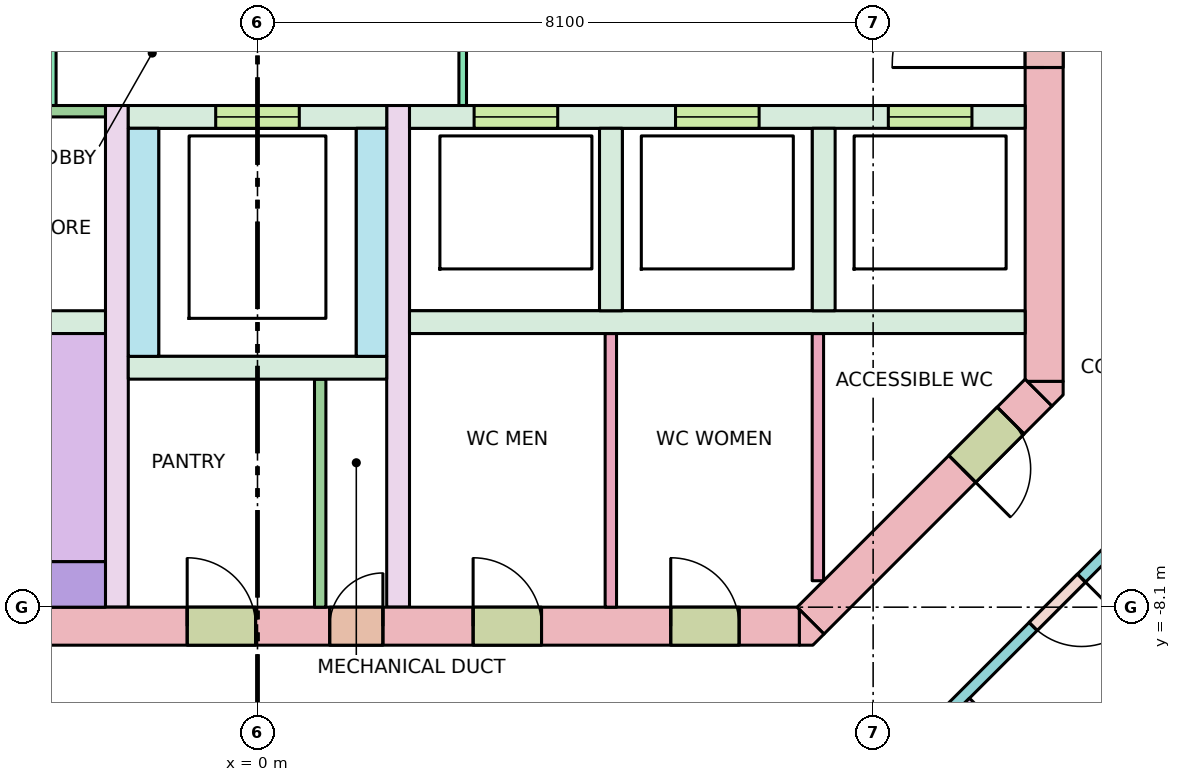
"""IFC4 building model, lengths in metres.
Left out: names, types, materials, properties, quantities, classifications, styles, units other than length and angle.
Written with IfcOpenShell. Run it as: python <this file> out.ifc"""

import sys

from ifc_helpers import new_model, si_unit, direction, frame, frame_2d, origin, place, context, subcontext, project, spatial, polyline, rectangle, outline, extrude, element, fill, save


model = new_model("IFC4")
c1 = context("Model", 3, precision=1e-05, world=origin(), true_north=direction((0.0, 1.0)))
c2 = subcontext(c1, "Body", "Model", "MODEL_VIEW")
j1 = project(units=[si_unit("LENGTHUNIT", "METRE"), si_unit("PLANEANGLEUNIT", "RADIAN")], contexts=[c1])
p1 = place(None, origin())
s1 = spatial("IfcSite", under=j1, at=p1, CompositionType="ELEMENT")
p2 = place(p1, origin())
s2 = spatial("IfcBuilding", under=s1, at=p2, CompositionType="ELEMENT")
p3 = place(p2, frame((0.0, 0.0, 253.8)))
s3 = spatial("IfcBuildingStorey", under=s2, at=p3, CompositionType="ELEMENT", Elevation=253.8)
p4 = place(p3, frame((-7.13, -8.35, -0.28), z_axis=(0.0, 0.0, 1.0), x_axis=(1.0, 0.0, 0.0)))
e1 = element("IfcWall", 1, at=p4, inside=s3, PredefinedType="SHEAR", context=c2, shape_type="SweptSolid", body=[
    extrude(rectangle(XDim=14.26, YDim=0.5, at=frame_2d((7.13, 0.0))), origin(), (0.0, 0.0, 1.0), 3.7),
])
p5 = place(p4, frame((8.08, 0.0, 0.28)))
e2 = element("IfcOpeningElement", 2, at=p5, cuts=e1, PredefinedType="OPENING", context=c2, shape_type="SweptSolid", body=[
    extrude(rectangle(XDim=0.7, YDim=2.1, at=frame_2d((0.35, 1.05))), frame((0.0, 0.26, 0.0), z_axis=(0.0, -1.0, 0.0), x_axis=(1.0, 0.0, 0.0)), (0.0, 0.0, 1.0), 0.52),
])
p6 = place(p4, frame((6.205, 0.0, 0.28)))
e3 = element("IfcOpeningElement", 3, at=p6, cuts=e1, PredefinedType="OPENING", context=c2, shape_type="SweptSolid", body=[
    extrude(rectangle(XDim=0.9, YDim=2.1, at=frame_2d((0.45, 1.05))), frame((0.0, 0.26, 0.0), z_axis=(0.0, -1.0, 0.0), x_axis=(1.0, 0.0, 0.0)), (0.0, 0.0, 1.0), 0.52),
])
p7 = place(p4, frame((9.967, 0.0, 0.28)))
e4 = element("IfcOpeningElement", 4, at=p7, cuts=e1, PredefinedType="OPENING", context=c2, shape_type="SweptSolid", body=[
    extrude(rectangle(XDim=0.9, YDim=2.1, at=frame_2d((0.45, 1.05))), frame((0.0, 0.26, 0.0), z_axis=(0.0, -1.0, 0.0), x_axis=(1.0, 0.0, 0.0)), (0.0, 0.0, 1.0), 0.52),
])
p8 = place(p4, frame((12.567, 0.0, 0.28)))
e5 = element("IfcOpeningElement", 5, at=p8, cuts=e1, PredefinedType="OPENING", context=c2, shape_type="SweptSolid", body=[
    extrude(rectangle(XDim=0.9, YDim=2.1, at=frame_2d((0.45, 1.05))), frame((0.0, 0.26, 0.0), z_axis=(0.0, -1.0, 0.0), x_axis=(1.0, 0.0, 0.0)), (0.0, 0.0, 1.0), 0.52),
])
p9 = place(p3, frame((10.35, -5.13, -0.28), z_axis=(0.0, 0.0, 1.0), x_axis=(0.0, 1.0, 0.0)))
e6 = element("IfcWall", 6, at=p9, inside=s3, PredefinedType="SHEAR", context=c2, shape_type="SweptSolid", body=[
    extrude(rectangle(XDim=10.26, YDim=0.5, at=frame_2d((5.13, 0.0))), origin(), (0.0, 0.0, 1.0), 3.7),
])
p10 = place(p9, frame((4.13, 0.0, 0.28)))
e7 = element("IfcOpeningElement", 7, at=p10, cuts=e6, PredefinedType="OPENING", context=c2, shape_type="SweptSolid", body=[
    extrude(rectangle(XDim=2.0, YDim=2.1, at=frame_2d((1.0, 1.05))), frame((0.0, 0.26, 0.0), z_axis=(0.0, -1.0, 0.0), x_axis=(1.0, 0.0, 0.0)), (0.0, 0.0, 1.0), 0.52),
])
p11 = place(p3, frame((10.277, -5.277, -0.28), z_axis=(0.0, 0.0, 1.0), x_axis=(-0.707106781187, -0.707106781187, 0.0)))
e8 = element("IfcWall", 8, at=p11, inside=s3, PredefinedType="SHEAR", context=c2, shape_type="SweptSolid", body=[
    extrude(rectangle(XDim=4.243, YDim=0.5, at=frame_2d((2.121, 0.0))), origin(), (0.0, 0.0, 1.0), 3.7),
])
p12 = place(p11, frame((0.52, 0.0, 0.28)))
e9 = element("IfcOpeningElement", 9, at=p12, cuts=e8, PredefinedType="OPENING", context=c2, shape_type="SweptSolid", body=[
    extrude(rectangle(XDim=0.9, YDim=2.1, at=frame_2d((0.45, 1.05))), frame((0.0, 0.26, 0.0), z_axis=(0.0, -1.0, 0.0), x_axis=(1.0, 0.0, 0.0)), (0.0, 0.0, 1.0), 0.52),
])
p13 = place(p3, frame((0.0, 0.0, -0.28)))
e10 = element("IfcWall", 10, at=p13, inside=s3, PredefinedType="SHEAR", context=c2, shape_type="SweptSolid", body=[
    extrude(outline(polyline([(7.307, -8.6), (7.13, -8.6), (7.13, -8.13), (7.454, -8.454), (7.307, -8.6)])), origin(), (0.0, 0.0, 1.0), 3.7),
])
p14 = place(p3, frame((0.0, 0.0, -0.28)))
e11 = element("IfcWall", 11, at=p14, inside=s3, PredefinedType="SHEAR", context=c2, shape_type="SweptSolid", body=[
    extrude(outline(polyline([(10.6, -5.307), (10.454, -5.454), (10.13, -5.13), (10.6, -5.13), (10.6, -5.307)])), origin(), (0.0, 0.0, 1.0), 3.7),
])
for number, where, z_axis, x_axis in (
    (12, (-10.1, -4.35, 0.0), (0.0, 0.0, 1.0), (1.0, 0.0, 0.0)),
    (13, (2.0, -4.35, 0.0), (0.0, 0.0, 1.0), (1.0, 0.0, 0.0)),
):
    element("IfcWall", number, at=place(p3, frame(where, z_axis=z_axis, x_axis=x_axis)), inside=s3, PredefinedType="SOLIDWALL", context=c2, shape_type="SweptSolid", body=[
        extrude(rectangle(XDim=8.1, YDim=0.3, at=frame_2d((4.05, 0.0))), origin(), (0.0, 0.0, 1.0), 3.42),
    ])
p15 = place(p3, frame((2.0, -1.65, 0.0), z_axis=(0.0, 0.0, 1.0), x_axis=(1.0, 0.0, 0.0)))
e14 = element("IfcWall", 14, at=p15, inside=s3, PredefinedType="SOLIDWALL", context=c2, shape_type="SweptSolid", body=[
    extrude(rectangle(XDim=8.1, YDim=0.3, at=frame_2d((4.05, 0.0))), origin(), (0.0, 0.0, 1.0), 3.42),
])
p16 = place(p15, frame((0.85, 0.0, 0.0)))
e15 = element("IfcOpeningElement", 15, at=p16, cuts=e14, PredefinedType="OPENING", context=c2, shape_type="SweptSolid", body=[
    extrude(rectangle(XDim=1.1, YDim=2.1, at=frame_2d((0.55, 1.05))), frame((0.0, 0.16, 0.0), z_axis=(0.0, -1.0, 0.0), x_axis=(1.0, 0.0, 0.0)), (0.0, 0.0, 1.0), 0.32),
])
p17 = place(p15, frame((3.5, 0.0, 0.0)))
e16 = element("IfcOpeningElement", 16, at=p17, cuts=e14, PredefinedType="OPENING", context=c2, shape_type="SweptSolid", body=[
    extrude(rectangle(XDim=1.1, YDim=2.1, at=frame_2d((0.55, 1.05))), frame((0.0, 0.16, 0.0), z_axis=(0.0, -1.0, 0.0), x_axis=(1.0, 0.0, 0.0)), (0.0, 0.0, 1.0), 0.32),
])
p18 = place(p15, frame((6.3, 0.0, 0.0)))
e17 = element("IfcOpeningElement", 17, at=p18, cuts=e14, PredefinedType="OPENING", context=c2, shape_type="SweptSolid", body=[
    extrude(rectangle(XDim=1.1, YDim=2.1, at=frame_2d((0.55, 1.05))), frame((0.0, 0.16, 0.0), z_axis=(0.0, -1.0, 0.0), x_axis=(1.0, 0.0, 0.0)), (0.0, 0.0, 1.0), 0.32),
])
for number, where, z_axis, x_axis in (
    (18, (4.65, -4.2, 0.0), (0.0, 0.0, 1.0), (0.0, 1.0, 0.0)),
    (19, (7.45, -4.2, 0.0), (0.0, 0.0, 1.0), (0.0, 1.0, 0.0)),
):
    element("IfcWall", number, at=place(p3, frame(where, z_axis=z_axis, x_axis=x_axis)), inside=s3, PredefinedType="SOLIDWALL", context=c2, shape_type="SweptSolid", body=[
        extrude(rectangle(XDim=2.4, YDim=0.3, at=frame_2d((1.2, 0.0))), origin(), (0.0, 0.0, 1.0), 3.42),
    ])
for number, where, z_axis, x_axis in (
    (20, (-1.85, -8.1, 0.0), (0.0, 0.0, 1.0), (0.0, 1.0, 0.0)),
    (21, (1.85, -8.1, 0.0), (0.0, 0.0, 1.0), (0.0, 1.0, 0.0)),
):
    element("IfcWall", number, at=place(p3, frame(where, z_axis=z_axis, x_axis=x_axis)), inside=s3, PredefinedType="SHEAR", context=c2, shape_type="SweptSolid", body=[
        extrude(rectangle(XDim=6.6, YDim=0.3, at=frame_2d((3.3, 0.0))), origin(), (0.0, 0.0, 1.0), 3.42),
    ])
p19 = place(p3, frame((-1.7, -1.65, 0.0), z_axis=(0.0, 0.0, 1.0), x_axis=(1.0, 0.0, 0.0)))
e22 = element("IfcWall", 22, at=p19, inside=s3, PredefinedType="SOLIDWALL", context=c2, shape_type="SweptSolid", body=[
    extrude(rectangle(XDim=3.4, YDim=0.3, at=frame_2d((1.7, 0.0))), origin(), (0.0, 0.0, 1.0), 3.42),
])
p20 = place(p19, frame((1.15, 0.0, 0.0)))
e23 = element("IfcOpeningElement", 23, at=p20, cuts=e22, PredefinedType="OPENING", context=c2, shape_type="SweptSolid", body=[
    extrude(rectangle(XDim=1.1, YDim=2.1, at=frame_2d((0.55, 1.05))), frame((0.0, 0.16, 0.0), z_axis=(0.0, -1.0, 0.0), x_axis=(1.0, 0.0, 0.0)), (0.0, 0.0, 1.0), 0.32),
])
for number, where, z_axis, x_axis in (
    (24, (-1.5, -4.8, 0.0), (0.0, 0.0, 1.0), (0.0, 1.0, 0.0)),
    (25, (1.5, -4.8, 0.0), (0.0, 0.0, 1.0), (0.0, 1.0, 0.0)),
):
    element("IfcWall", number, at=place(p3, frame(where, z_axis=z_axis, x_axis=x_axis)), inside=s3, PredefinedType="SOLIDWALL", context=c2, shape_type="SweptSolid", body=[
        extrude(rectangle(XDim=3.0, YDim=0.4, at=frame_2d((1.5, 0.0))), origin(), (0.0, 0.0, 1.0), 3.42),
    ])
p21 = place(p3, frame((-1.7, -4.95, 0.0), z_axis=(0.0, 0.0, 1.0), x_axis=(1.0, 0.0, 0.0)))
e26 = element("IfcWall", 26, at=p21, inside=s3, PredefinedType="SOLIDWALL", context=c2, shape_type="SweptSolid", body=[
    extrude(rectangle(XDim=3.4, YDim=0.3, at=frame_2d((1.7, 0.0))), origin(), (0.0, 0.0, 1.0), 3.42),
])
p22 = place(p3, frame((-7.37, -7.8, 0.0), z_axis=(0.0, 0.0, 1.0), x_axis=(1.0, 0.0, 0.0)))
e27 = element("IfcWall", 27, at=p22, inside=s3, PredefinedType="SHEAR", context=c2, shape_type="SweptSolid", body=[
    extrude(rectangle(XDim=5.37, YDim=0.6, at=frame_2d((2.685, 0.0))), origin(), (0.0, 0.0, 1.0), 3.42),
])
p23 = place(p3, frame((-2.7, -1.5, 0.0), z_axis=(0.0, 0.0, 1.0), x_axis=(0.0, 1.0, 0.0)))
e28 = element("IfcWall", 28, at=p23, inside=s3, PredefinedType="PARTITIONING", context=c2, shape_type="SweptSolid", body=[
    extrude(rectangle(XDim=3.0, YDim=0.1, at=frame_2d((1.5, 0.0))), origin(), (0.0, 0.0, 1.0), 3.42),
])
p24 = place(p23, frame((0.9, 0.0, 0.0)))
e29 = element("IfcOpeningElement", 29, at=p24, cuts=e28, PredefinedType="OPENING", context=c2, shape_type="SweptSolid", body=[
    extrude(rectangle(XDim=1.2, YDim=2.1, at=frame_2d((0.6, 1.05))), frame((0.0, 0.06, 0.0), z_axis=(0.0, -1.0, 0.0), x_axis=(1.0, 0.0, 0.0)), (0.0, 0.0, 1.0), 0.12),
])
p25 = place(p3, frame((2.7, -1.5, 0.0), z_axis=(0.0, 0.0, 1.0), x_axis=(0.0, 1.0, 0.0)))
e30 = element("IfcWall", 30, at=p25, inside=s3, PredefinedType="PARTITIONING", context=c2, shape_type="SweptSolid", body=[
    extrude(rectangle(XDim=3.0, YDim=0.1, at=frame_2d((1.5, 0.0))), origin(), (0.0, 0.0, 1.0), 3.42),
])
p26 = place(p25, frame((0.9, 0.0, 0.0)))
e31 = element("IfcOpeningElement", 31, at=p26, cuts=e30, PredefinedType="OPENING", context=c2, shape_type="SweptSolid", body=[
    extrude(rectangle(XDim=1.2, YDim=2.1, at=frame_2d((0.6, 1.05))), frame((0.0, 0.06, 0.0), z_axis=(0.0, -1.0, 0.0), x_axis=(1.0, 0.0, 0.0)), (0.0, 0.0, 1.0), 0.12),
])
p27 = place(p3, frame((0.825, -8.1, 0.0), z_axis=(0.0, 0.0, 1.0), x_axis=(0.0, 1.0, 0.0)))
e32 = element("IfcWall", 32, at=p27, inside=s3, PredefinedType="PARTITIONING", context=c2, shape_type="SweptSolid", body=[
    extrude(rectangle(XDim=3.0, YDim=0.15, at=frame_2d((1.5, 0.0))), origin(), (0.0, 0.0, 1.0), 3.42),
])
p28 = place(p3, frame((4.649, -8.1, 0.0), z_axis=(0.0, 0.0, 1.0), x_axis=(0.0, 1.0, 0.0)))
e33 = element("IfcWall", 33, at=p28, inside=s3, PredefinedType="PARTITIONING", context=c2, shape_type="SweptSolid", body=[
    extrude(rectangle(XDim=3.6, YDim=0.15, at=frame_2d((1.8, 0.0))), origin(), (0.0, 0.0, 1.0), 3.42),
])
p29 = place(p3, frame((7.373, -7.752, 0.0), z_axis=(0.0, 0.0, 1.0), x_axis=(0.0, 1.0, 0.0)))
e34 = element("IfcWall", 34, at=p29, inside=s3, PredefinedType="PARTITIONING", context=c2, shape_type="SweptSolid", body=[
    extrude(rectangle(XDim=3.252, YDim=0.15, at=frame_2d((1.626, 0.0))), origin(), (0.0, 0.0, 1.0), 3.42),
])
p30 = place(p3, frame((-10.1, -1.575, 0.0), z_axis=(0.0, 0.0, 1.0), x_axis=(1.0, 0.0, 0.0)))
e35 = element("IfcWall", 35, at=p30, inside=s3, PredefinedType="PARTITIONING", context=c2, shape_type="SweptSolid", body=[
    extrude(rectangle(XDim=8.1, YDim=0.15, at=frame_2d((4.05, 0.0))), origin(), (0.0, 0.0, 1.0), 3.42),
])
p31 = place(p30, frame((0.941, 0.0, 0.0)))
e36 = element("IfcOpeningElement", 36, at=p31, cuts=e35, PredefinedType="OPENING", context=c2, shape_type="SweptSolid", body=[
    extrude(rectangle(XDim=0.9, YDim=2.1, at=frame_2d((0.45, 1.05))), frame((0.0, 0.085, 0.0), z_axis=(0.0, -1.0, 0.0), x_axis=(1.0, 0.0, 0.0)), (0.0, 0.0, 1.0), 0.17),
])
p32 = place(p30, frame((5.066, 0.0, 0.0)))
e37 = element("IfcOpeningElement", 37, at=p32, cuts=e35, PredefinedType="OPENING", context=c2, shape_type="SweptSolid", body=[
    extrude(rectangle(XDim=0.9, YDim=2.1, at=frame_2d((0.45, 1.05))), frame((0.0, 0.085, 0.0), z_axis=(0.0, -1.0, 0.0), x_axis=(1.0, 0.0, 0.0)), (0.0, 0.0, 1.0), 0.17),
])
p33 = place(p3, frame((12.438, -6.121, 0.0), z_axis=(0.0, 0.0, 1.0), x_axis=(-0.707106781187, -0.707106781187, 0.0)))
e38 = element("IfcWall", 38, at=p33, inside=s3, PredefinedType="PARTITIONING", context=c2, shape_type="SweptSolid", body=[
    extrude(rectangle(XDim=6.105, YDim=0.15, at=frame_2d((3.053, 0.0))), origin(), (0.0, 0.0, 1.0), 2.57),
])
p34 = place(p33, frame((4.811, 0.0, 0.0)))
e39 = element("IfcOpeningElement", 39, at=p34, cuts=e38, PredefinedType="OPENING", context=c2, shape_type="SweptSolid", body=[
    extrude(rectangle(XDim=0.9, YDim=2.1, at=frame_2d((0.45, 1.05))), frame((0.0, 0.085, 0.0), z_axis=(0.0, -1.0, 0.0), x_axis=(1.0, 0.0, 0.0)), (0.0, 0.0, 1.0), 0.17),
])
p35 = place(p33, frame((2.258, 0.0, 0.0)))
e40 = element("IfcOpeningElement", 40, at=p35, cuts=e38, PredefinedType="OPENING", context=c2, shape_type="SweptSolid", body=[
    extrude(rectangle(XDim=0.9, YDim=2.1, at=frame_2d((0.45, 1.05))), frame((0.0, 0.085, 0.0), z_axis=(0.0, -1.0, 0.0), x_axis=(1.0, 0.0, 0.0)), (0.0, 0.0, 1.0), 0.17),
])
p36 = place(p3, frame((9.333, -9.333, 0.0), z_axis=(0.0, 0.0, 1.0), x_axis=(0.707106781187, -0.707106781187, 0.0)))
e41 = element("IfcWall", 41, at=p36, inside=s3, PredefinedType="PARTITIONING", context=c2, shape_type="SweptSolid", body=[
    extrude(rectangle(XDim=7.639, YDim=0.1, at=frame_2d((3.819, 0.0))), origin(), (0.0, 0.0, 1.0), 2.57),
])
p37 = place(p16, origin())
e42 = element("IfcDoor", 42, at=p37, inside=s3, OperationType="DOUBLE_DOOR_SLIDING", PredefinedType="DOOR", context=c2, shape_type="SweptSolid", body=[
    extrude(rectangle(XDim=1.1, YDim=2.1, at=frame_2d((0.55, 1.05))), frame((0.0, 0.025, 0.0), z_axis=(0.0, -1.0, 0.0), x_axis=(1.0, 0.0, 0.0)), (0.0, 0.0, 1.0), 0.05),
])
fill(e15, e42)
p38 = place(p17, origin())
e43 = element("IfcDoor", 43, at=p38, inside=s3, OperationType="DOUBLE_DOOR_SLIDING", PredefinedType="DOOR", context=c2, shape_type="SweptSolid", body=[
    extrude(rectangle(XDim=1.1, YDim=2.1, at=frame_2d((0.55, 1.05))), frame((0.0, 0.025, 0.0), z_axis=(0.0, -1.0, 0.0), x_axis=(1.0, 0.0, 0.0)), (0.0, 0.0, 1.0), 0.05),
])
fill(e16, e43)
p39 = place(p18, origin())
e44 = element("IfcDoor", 44, at=p39, inside=s3, OperationType="DOUBLE_DOOR_SLIDING", PredefinedType="DOOR", context=c2, shape_type="SweptSolid", body=[
    extrude(rectangle(XDim=1.1, YDim=2.1, at=frame_2d((0.55, 1.05))), frame((0.0, 0.025, 0.0), z_axis=(0.0, -1.0, 0.0), x_axis=(1.0, 0.0, 0.0)), (0.0, 0.0, 1.0), 0.05),
])
fill(e17, e44)
p40 = place(p20, origin())
e45 = element("IfcDoor", 45, at=p40, inside=s3, OperationType="DOUBLE_DOOR_SLIDING", PredefinedType="DOOR", context=c2, shape_type="SweptSolid", body=[
    extrude(rectangle(XDim=1.1, YDim=2.1, at=frame_2d((0.55, 1.05))), frame((0.0, 0.025, 0.0), z_axis=(0.0, -1.0, 0.0), x_axis=(1.0, 0.0, 0.0)), (0.0, 0.0, 1.0), 0.05),
])
fill(e23, e45)
p41 = place(p10, origin())
e46 = element("IfcDoor", 46, at=p41, inside=s3, OperationType="DOUBLE_DOOR_SINGLE_SWING", PredefinedType="DOOR", context=c2, shape_type="SweptSolid", body=[
    extrude(rectangle(XDim=2.0, YDim=2.1, at=frame_2d((1.0, 1.05))), frame((0.0, 0.025, 0.0), z_axis=(0.0, -1.0, 0.0), x_axis=(1.0, 0.0, 0.0)), (0.0, 0.0, 1.0), 0.05),
])
fill(e7, e46)
p42 = place(p5, origin())
e47 = element("IfcDoor", 47, at=p42, inside=s3, OperationType="SINGLE_SWING_RIGHT", PredefinedType="DOOR", context=c2, shape_type="SweptSolid", body=[
    extrude(rectangle(XDim=0.7, YDim=2.1, at=frame_2d((0.35, 1.05))), frame((0.0, 0.025, 0.0), z_axis=(0.0, -1.0, 0.0), x_axis=(1.0, 0.0, 0.0)), (0.0, 0.0, 1.0), 0.05),
])
fill(e2, e47)
p43 = place(p6, origin())
e48 = element("IfcDoor", 48, at=p43, inside=s3, OperationType="SINGLE_SWING_LEFT", PredefinedType="DOOR", context=c2, shape_type="SweptSolid", body=[
    extrude(rectangle(XDim=0.9, YDim=2.1, at=frame_2d((0.45, 1.05))), frame((0.0, 0.025, 0.0), z_axis=(0.0, -1.0, 0.0), x_axis=(1.0, 0.0, 0.0)), (0.0, 0.0, 1.0), 0.05),
])
fill(e3, e48)
p44 = place(p7, origin())
e49 = element("IfcDoor", 49, at=p44, inside=s3, OperationType="SINGLE_SWING_LEFT", PredefinedType="DOOR", context=c2, shape_type="SweptSolid", body=[
    extrude(rectangle(XDim=0.9, YDim=2.1, at=frame_2d((0.45, 1.05))), frame((0.0, 0.025, 0.0), z_axis=(0.0, -1.0, 0.0), x_axis=(1.0, 0.0, 0.0)), (0.0, 0.0, 1.0), 0.05),
])
fill(e4, e49)
p45 = place(p8, origin())
e50 = element("IfcDoor", 50, at=p45, inside=s3, OperationType="SINGLE_SWING_LEFT", PredefinedType="DOOR", context=c2, shape_type="SweptSolid", body=[
    extrude(rectangle(XDim=0.9, YDim=2.1, at=frame_2d((0.45, 1.05))), frame((0.0, 0.025, 0.0), z_axis=(0.0, -1.0, 0.0), x_axis=(1.0, 0.0, 0.0)), (0.0, 0.0, 1.0), 0.05),
])
fill(e5, e50)
p46 = place(p12, origin())
e51 = element("IfcDoor", 51, at=p46, inside=s3, OperationType="SINGLE_SWING_RIGHT", PredefinedType="DOOR", context=c2, shape_type="SweptSolid", body=[
    extrude(rectangle(XDim=0.9, YDim=2.1, at=frame_2d((0.45, 1.05))), frame((0.0, 0.025, 0.0), z_axis=(0.0, -1.0, 0.0), x_axis=(1.0, 0.0, 0.0)), (0.0, 0.0, 1.0), 0.05),
])
fill(e9, e51)
p47 = place(p35, origin())
e52 = element("IfcDoor", 52, at=p47, inside=s3, OperationType="SINGLE_SWING_LEFT", PredefinedType="DOOR", context=c2, shape_type="SweptSolid", body=[
    extrude(rectangle(XDim=0.9, YDim=2.1, at=frame_2d((0.45, 1.05))), frame((0.0, 0.025, 0.0), z_axis=(0.0, -1.0, 0.0), x_axis=(1.0, 0.0, 0.0)), (0.0, 0.0, 1.0), 0.05),
])
fill(e40, e52)
save(model, sys.argv[1])
